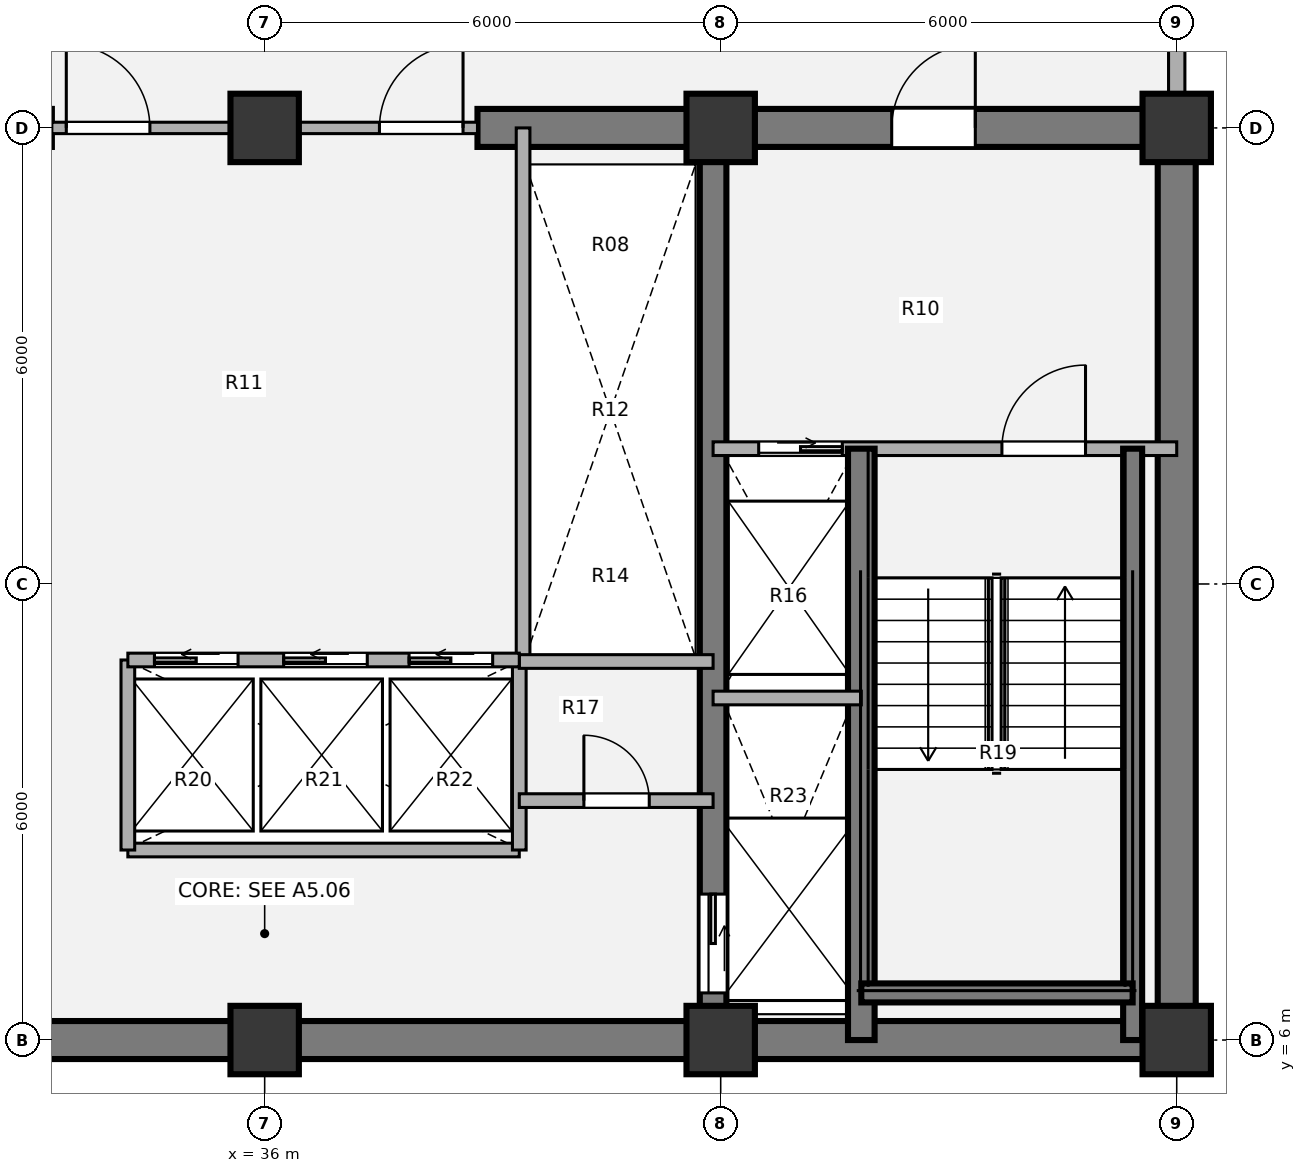
"""IFC4 building model, lengths in metres.
Left out: names, types, materials, properties, quantities, classifications, styles, units other than length and angle.
Written with IfcOpenShell. Run it as: python <this file> out.ifc"""

import sys

from ifc_helpers import new_model, si_unit, direction, frame, frame_2d, origin, origin_2d, place, context, subcontext, project, spatial, rectangle, extrude, source, transform, mapped, element, fill, save


model = new_model("IFC4")
c1 = context("Model", 3, precision=1e-05, world=origin(), true_north=direction((0.0, 1.0)))
c2 = subcontext(c1, "Body", "Model", "MODEL_VIEW")
j1 = project(units=[si_unit("LENGTHUNIT", "METRE"), si_unit("PLANEANGLEUNIT", "RADIAN")], contexts=[c1])
p1 = place(None, origin())
s1 = spatial("IfcSite", under=j1, at=p1, CompositionType="ELEMENT")
p2 = place(p1, origin())
s2 = spatial("IfcBuilding", under=s1, at=p2, CompositionType="ELEMENT")
p3 = place(p2, frame((0.0, 0.0, 120.06)))
s3 = spatial("IfcBuildingStorey", under=s2, at=p3, CompositionType="ELEMENT", Elevation=120.06)
m1 = source(origin(), c2, "Body", "SweptSolid", [
    extrude(rectangle(XDim=0.9, YDim=0.9, at=origin_2d()), origin(), (0.0, 0.0, 1.0), 3.78),
])
for number, where, z_axis, x_axis in (
    (1, (36.0, 6.0, 0.0), (0.0, 0.0, 1.0), (1.0, 0.0, 0.0)),
    (2, (42.0, 6.0, 0.0), (0.0, 0.0, 1.0), (1.0, 0.0, 0.0)),
    (3, (48.0, 6.0, 0.0), (0.0, 0.0, 1.0), (1.0, 0.0, 0.0)),
    (4, (36.0, 18.0, 0.0), (0.0, 0.0, 1.0), (1.0, 0.0, 0.0)),
    (5, (42.0, 18.0, 0.0), (0.0, 0.0, 1.0), (1.0, 0.0, 0.0)),
    (6, (48.0, 18.0, 0.0), (0.0, 0.0, 1.0), (1.0, 0.0, 0.0)),
):
    element("IfcColumn", number, at=place(p3, frame(where, z_axis=z_axis, x_axis=x_axis)), inside=s3, PredefinedType="COLUMN", context=c2, shape_type="MappedRepresentation", body=[
        mapped(m1, transform((0.0, 0.0, 0.0), x_axis=(1.0, 0.0, 0.0), y_axis=(0.0, 1.0, 0.0), z_axis=(0.0, 0.0, 1.0), scale=1.0)),
    ])
p4 = place(p3, frame((48.25, 6.0, 0.0), z_axis=(0.0, 0.0, 1.0), x_axis=(-1.0, 0.0, 0.0)))
e7 = element("IfcWall", 7, at=p4, inside=s3, PredefinedType="SHEAR", context=c2, shape_type="SweptSolid", body=[
    extrude(rectangle(XDim=24.5, YDim=0.5, at=frame_2d((12.25, 0.0))), origin(), (0.0, 0.0, 1.0), 3.78),
])
p5 = place(p3, frame((48.0, 18.0, 0.0), z_axis=(0.0, 0.0, 1.0), x_axis=(0.0, -1.0, 0.0)))
e8 = element("IfcWall", 8, at=p5, inside=s3, PredefinedType="SHEAR", context=c2, shape_type="SweptSolid", body=[
    extrude(rectangle(XDim=12.0, YDim=0.5, at=frame_2d((6.0, 0.0))), origin(), (0.0, 0.0, 1.0), 3.78),
])
p6 = place(p3, frame((23.75, 18.0, 0.0), z_axis=(0.0, 0.0, 1.0), x_axis=(1.0, 0.0, 0.0)))
e9 = element("IfcWall", 9, at=p6, inside=s3, PredefinedType="SHEAR", context=c2, shape_type="SweptSolid", body=[
    extrude(rectangle(XDim=9.45, YDim=0.5, at=frame_2d((4.725, 0.0))), origin(), (0.0, 0.0, 1.0), 3.78),
])
p7 = place(p6, frame((2.95, 0.0, 0.0)))
e10 = element("IfcOpeningElement", 10, at=p7, cuts=e9, PredefinedType="OPENING", context=c2, shape_type="SweptSolid", body=[
    extrude(rectangle(XDim=1.1, YDim=2.1, at=origin_2d()), frame((0.55, 0.26, 1.05), z_axis=(0.0, -1.0, 0.0), x_axis=(1.0, 0.0, 0.0)), (0.0, 0.0, 1.0), 0.52),
])
p8 = place(p3, frame((38.8, 18.0, 0.0), z_axis=(0.0, 0.0, 1.0), x_axis=(1.0, 0.0, 0.0)))
e11 = element("IfcWall", 11, at=p8, inside=s3, PredefinedType="SHEAR", context=c2, shape_type="SweptSolid", body=[
    extrude(rectangle(XDim=9.45, YDim=0.5, at=frame_2d((4.725, 0.0))), origin(), (0.0, 0.0, 1.0), 3.78),
])
p9 = place(p8, frame((5.45, 0.0, 0.0)))
e12 = element("IfcOpeningElement", 12, at=p9, cuts=e11, PredefinedType="OPENING", context=c2, shape_type="SweptSolid", body=[
    extrude(rectangle(XDim=1.1, YDim=2.1, at=origin_2d()), frame((0.55, 0.26, 1.05), z_axis=(0.0, -1.0, 0.0), x_axis=(1.0, 0.0, 0.0)), (0.0, 0.0, 1.0), 0.52),
])
p10 = place(p3, frame((41.9, 18.0, 0.0), z_axis=(0.0, 0.0, 1.0), x_axis=(0.0, -1.0, 0.0)))
e13 = element("IfcWall", 13, at=p10, inside=s3, PredefinedType="SHEAR", context=c2, shape_type="SweptSolid", body=[
    extrude(rectangle(XDim=12.0, YDim=0.35, at=frame_2d((6.0, 0.0))), origin(), (0.0, 0.0, 1.0), 3.78),
])
p11 = place(p10, frame((10.08, 0.0, 0.0)))
e14 = element("IfcOpeningElement", 14, at=p11, cuts=e13, PredefinedType="OPENING", context=c2, shape_type="SweptSolid", body=[
    extrude(rectangle(XDim=1.3, YDim=2.1, at=origin_2d()), frame((0.65, 0.185, 1.05), z_axis=(0.0, -1.0, 0.0), x_axis=(1.0, 0.0, 0.0)), (0.0, 0.0, 1.0), 0.37),
])
p12 = place(p3, frame((48.0, 21.05, 0.0), z_axis=(0.0, 0.0, 1.0), x_axis=(0.0, -1.0, 0.0)))
e15 = element("IfcWall", 15, at=p12, inside=s3, PredefinedType="SOLIDWALL", context=c2, shape_type="SweptSolid", body=[
    extrude(rectangle(XDim=2.62, YDim=0.215, at=frame_2d((1.31, 0.0))), origin(), (0.0, 0.0, 1.0), 3.53),
])
p13 = place(p3, frame((34.2, 8.5, 0.0), z_axis=(0.0, 0.0, 1.0), x_axis=(1.0, 0.0, 0.0)))
e16 = element("IfcWall", 16, at=p13, inside=s3, PredefinedType="PARTITIONING", context=c2, shape_type="SweptSolid", body=[
    extrude(rectangle(XDim=5.15, YDim=0.18, at=frame_2d((2.575, 0.0))), origin(), (0.0, 0.0, 1.0), 3.5),
])
for number, where, z_axis, x_axis in (
    (17, (34.2, 8.5, 0.0), (0.0, 0.0, 1.0), (0.0, 1.0, 0.0)),
    (18, (39.35, 8.5, 0.0), (0.0, 0.0, 1.0), (0.0, 1.0, 0.0)),
):
    element("IfcWall", number, at=place(p3, frame(where, z_axis=z_axis, x_axis=x_axis)), inside=s3, PredefinedType="PARTITIONING", context=c2, shape_type="SweptSolid", body=[
        extrude(rectangle(XDim=2.5, YDim=0.18, at=frame_2d((1.25, 0.0))), origin(), (0.0, 0.0, 1.0), 3.5),
    ])
p14 = place(p3, frame((39.4, 11.0, 0.0), z_axis=(0.0, 0.0, 1.0), x_axis=(0.0, 1.0, 0.0)))
e19 = element("IfcWall", 19, at=p14, inside=s3, PredefinedType="PARTITIONING", context=c2, shape_type="SweptSolid", body=[
    extrude(rectangle(XDim=7.0, YDim=0.18, at=frame_2d((3.5, 0.0))), origin(), (0.0, 0.0, 1.0), 3.5),
])
p15 = place(p3, frame((39.35, 10.98, 0.0), z_axis=(0.0, 0.0, 1.0), x_axis=(1.0, 0.0, 0.0)))
e20 = element("IfcWall", 20, at=p15, inside=s3, PredefinedType="PARTITIONING", context=c2, shape_type="SweptSolid", body=[
    extrude(rectangle(XDim=2.55, YDim=0.18, at=frame_2d((1.275, 0.0))), origin(), (0.0, 0.0, 1.0), 3.5),
])
p16 = place(p3, frame((39.35, 9.15, 0.0), z_axis=(0.0, 0.0, 1.0), x_axis=(1.0, 0.0, 0.0)))
e21 = element("IfcWall", 21, at=p16, inside=s3, PredefinedType="PARTITIONING", context=c2, shape_type="SweptSolid", body=[
    extrude(rectangle(XDim=2.55, YDim=0.18, at=frame_2d((1.275, 0.0))), origin(), (0.0, 0.0, 1.0), 3.5),
])
p17 = place(p16, frame((0.85, 0.0, 0.0)))
e22 = element("IfcOpeningElement", 22, at=p17, cuts=e21, PredefinedType="OPENING", context=c2, shape_type="SweptSolid", body=[
    extrude(rectangle(XDim=0.86, YDim=2.1, at=origin_2d()), frame((0.43, 0.1, 1.05), z_axis=(0.0, -1.0, 0.0), x_axis=(1.0, 0.0, 0.0)), (0.0, 0.0, 1.0), 0.2),
])
p18 = place(p3, frame((33.2, 18.0, 0.0), z_axis=(0.0, 0.0, 1.0), x_axis=(1.0, 0.0, 0.0)))
e23 = element("IfcWall", 23, at=p18, inside=s3, PredefinedType="PARTITIONING", context=c2, shape_type="SweptSolid", body=[
    extrude(rectangle(XDim=5.6, YDim=0.15, at=frame_2d((2.8, 0.0))), origin(), (0.0, 0.0, 1.0), 2.315),
])
p19 = place(p18, frame((0.19, 0.0, 0.0)))
e24 = element("IfcOpeningElement", 24, at=p19, cuts=e23, PredefinedType="OPENING", context=c2, shape_type="SweptSolid", body=[
    extrude(rectangle(XDim=1.1, YDim=2.1, at=origin_2d()), frame((0.55, 0.085, 1.05), z_axis=(0.0, -1.0, 0.0), x_axis=(1.0, 0.0, 0.0)), (0.0, 0.0, 1.0), 0.17),
])
p20 = place(p18, frame((4.31, 0.0, 0.0)))
e25 = element("IfcOpeningElement", 25, at=p20, cuts=e23, PredefinedType="OPENING", context=c2, shape_type="SweptSolid", body=[
    extrude(rectangle(XDim=1.1, YDim=2.1, at=origin_2d()), frame((0.55, 0.085, 1.05), z_axis=(0.0, -1.0, 0.0), x_axis=(1.0, 0.0, 0.0)), (0.0, 0.0, 1.0), 0.17),
])
p21 = place(p3, frame((41.9, 13.78, 0.0), z_axis=(0.0, 0.0, 1.0), x_axis=(1.0, 0.0, 0.0)))
e26 = element("IfcWall", 26, at=p21, inside=s3, PredefinedType="PARTITIONING", context=c2, shape_type="SweptSolid", body=[
    extrude(rectangle(XDim=6.1, YDim=0.18, at=frame_2d((3.05, 0.0))), origin(), (0.0, 0.0, 1.0), 3.5),
])
p22 = place(p21, frame((0.6, 0.0, 0.0)))
e27 = element("IfcOpeningElement", 27, at=p22, cuts=e26, PredefinedType="OPENING", context=c2, shape_type="SweptSolid", body=[
    extrude(rectangle(XDim=1.1, YDim=2.1, at=origin_2d()), frame((0.55, 0.1, 1.05), z_axis=(0.0, -1.0, 0.0), x_axis=(1.0, 0.0, 0.0)), (0.0, 0.0, 1.0), 0.2),
])
p23 = place(p21, frame((3.8, 0.0, 0.0)))
e28 = element("IfcOpeningElement", 28, at=p23, cuts=e26, PredefinedType="OPENING", context=c2, shape_type="SweptSolid", body=[
    extrude(rectangle(XDim=1.1, YDim=2.1, at=origin_2d()), frame((0.55, 0.1, 1.05), z_axis=(0.0, -1.0, 0.0), x_axis=(1.0, 0.0, 0.0)), (0.0, 0.0, 1.0), 0.2),
])
p24 = place(p3, frame((43.85, 6.0, 0.0), z_axis=(0.0, 0.0, 1.0), x_axis=(0.0, 1.0, 0.0)))
e29 = element("IfcWall", 29, at=p24, inside=s3, PredefinedType="SHEAR", context=c2, shape_type="SweptSolid", body=[
    extrude(rectangle(XDim=7.78, YDim=0.35, at=frame_2d((3.89, 0.0))), origin(), (0.0, 0.0, 1.0), 3.85),
])
p25 = place(p3, frame((47.42, 6.0, 0.0), z_axis=(0.0, 0.0, 1.0), x_axis=(0.0, 1.0, 0.0)))
e30 = element("IfcWall", 30, at=p25, inside=s3, PredefinedType="SHEAR", context=c2, shape_type="SweptSolid", body=[
    extrude(rectangle(XDim=7.78, YDim=0.25, at=frame_2d((3.89, 0.0))), origin(), (0.0, 0.0, 1.0), 3.85),
])
p26 = place(p3, frame((43.85, 6.62, 0.0), z_axis=(0.0, 0.0, 1.0), x_axis=(1.0, 0.0, 0.0)))
e31 = element("IfcWall", 31, at=p26, inside=s3, PredefinedType="SHEAR", context=c2, shape_type="SweptSolid", body=[
    extrude(rectangle(XDim=3.57, YDim=0.25, at=frame_2d((1.785, 0.0))), origin(), (0.0, 0.0, 1.0), 3.85),
])
p27 = place(p3, frame((41.9, 10.5, 0.0), z_axis=(0.0, 0.0, 1.0), x_axis=(1.0, 0.0, 0.0)))
e32 = element("IfcWall", 32, at=p27, inside=s3, PredefinedType="PARTITIONING", context=c2, shape_type="SweptSolid", body=[
    extrude(rectangle(XDim=1.95, YDim=0.18, at=frame_2d((0.975, 0.0))), origin(), (0.0, 0.0, 1.0), 3.5),
])
p28 = place(p3, frame((34.2, 11.0, 0.0), z_axis=(0.0, 0.0, 1.0), x_axis=(1.0, 0.0, 0.0)))
e33 = element("IfcWall", 33, at=p28, inside=s3, PredefinedType="PARTITIONING", context=c2, shape_type="SweptSolid", body=[
    extrude(rectangle(XDim=5.15, YDim=0.18, at=frame_2d((2.575, 0.0))), origin(), (0.0, 0.0, 1.0), 3.5),
])
p29 = place(p28, frame((0.35, 0.0, 0.0)))
e34 = element("IfcOpeningElement", 34, at=p29, cuts=e33, PredefinedType="OPENING", context=c2, shape_type="SweptSolid", body=[
    extrude(rectangle(XDim=1.1, YDim=2.1, at=origin_2d()), frame((0.55, 0.1, 1.05), z_axis=(0.0, -1.0, 0.0), x_axis=(1.0, 0.0, 0.0)), (0.0, 0.0, 1.0), 0.2),
])
p30 = place(p28, frame((2.05, 0.0, 0.0)))
e35 = element("IfcOpeningElement", 35, at=p30, cuts=e33, PredefinedType="OPENING", context=c2, shape_type="SweptSolid", body=[
    extrude(rectangle(XDim=1.1, YDim=2.1, at=origin_2d()), frame((0.55, 0.1, 1.05), z_axis=(0.0, -1.0, 0.0), x_axis=(1.0, 0.0, 0.0)), (0.0, 0.0, 1.0), 0.2),
])
p31 = place(p28, frame((3.7, 0.0, 0.0)))
e36 = element("IfcOpeningElement", 36, at=p31, cuts=e33, PredefinedType="OPENING", context=c2, shape_type="SweptSolid", body=[
    extrude(rectangle(XDim=1.1, YDim=2.1, at=origin_2d()), frame((0.55, 0.1, 1.05), z_axis=(0.0, -1.0, 0.0), x_axis=(1.0, 0.0, 0.0)), (0.0, 0.0, 1.0), 0.2),
])
m2 = source(origin(), c2, "Body", "SweptSolid", [
    extrude(rectangle(XDim=0.86, YDim=2.1, at=origin_2d()), frame((0.43, 0.025, 1.05), z_axis=(0.0, -1.0, 0.0), x_axis=(1.0, 0.0, 0.0)), (0.0, 0.0, 1.0), 0.05),
])
p32 = place(p17, origin())
e37 = element("IfcDoor", 37, at=p32, inside=s3, OperationType="SINGLE_SWING_LEFT", PredefinedType="DOOR", context=c2, shape_type="MappedRepresentation", body=[
    mapped(m2, transform((0.0, 0.0, 0.0), x_axis=(1.0, 0.0, 0.0), y_axis=(0.0, 1.0, 0.0), z_axis=(0.0, 0.0, 1.0), scale=1.0)),
])
fill(e22, e37)
m3 = source(origin(), c2, "Body", "SweptSolid", [
    extrude(rectangle(XDim=1.1, YDim=2.1, at=origin_2d()), frame((0.55, 0.025, 1.05), z_axis=(0.0, -1.0, 0.0), x_axis=(1.0, 0.0, 0.0)), (0.0, 0.0, 1.0), 0.05),
])
p33 = place(p19, origin())
e38 = element("IfcDoor", 38, at=p33, inside=s3, OperationType="SINGLE_SWING_LEFT", PredefinedType="DOOR", context=c2, shape_type="MappedRepresentation", body=[
    mapped(m3, transform((0.0, 0.0, 0.0), x_axis=(1.0, 0.0, 0.0), y_axis=(0.0, 1.0, 0.0), z_axis=(0.0, 0.0, 1.0), scale=1.0)),
])
fill(e24, e38)
p34 = place(p20, origin())
e39 = element("IfcDoor", 39, at=p34, inside=s3, OperationType="SINGLE_SWING_RIGHT", PredefinedType="DOOR", context=c2, shape_type="MappedRepresentation", body=[
    mapped(m3, transform((0.0, 0.0, 0.0), x_axis=(1.0, 0.0, 0.0), y_axis=(0.0, 1.0, 0.0), z_axis=(0.0, 0.0, 1.0), scale=1.0)),
])
fill(e25, e39)
m4 = source(origin(), c2, "Body", "SweptSolid", [
    extrude(rectangle(XDim=1.1, YDim=2.1, at=origin_2d()), frame((0.55, 0.025, 1.05), z_axis=(0.0, -1.0, 0.0), x_axis=(1.0, 0.0, 0.0)), (0.0, 0.0, 1.0), 0.05),
])
p35 = place(p22, origin())
e40 = element("IfcDoor", 40, at=p35, inside=s3, OperationType="SLIDING_TO_RIGHT", PredefinedType="DOOR", context=c2, shape_type="MappedRepresentation", body=[
    mapped(m4, transform((0.0, 0.0, 0.0), x_axis=(1.0, 0.0, 0.0), y_axis=(0.0, 1.0, 0.0), z_axis=(0.0, 0.0, 1.0), scale=1.0)),
])
fill(e27, e40)
m5 = source(origin(), c2, "Body", "SweptSolid", [
    extrude(rectangle(XDim=1.1, YDim=2.1, at=origin_2d()), frame((0.55, 0.025, 1.05), z_axis=(0.0, -1.0, 0.0), x_axis=(1.0, 0.0, 0.0)), (0.0, 0.0, 1.0), 0.05),
])
p36 = place(p23, origin())
e41 = element("IfcDoor", 41, at=p36, inside=s3, OperationType="SINGLE_SWING_RIGHT", PredefinedType="DOOR", context=c2, shape_type="MappedRepresentation", body=[
    mapped(m5, transform((0.0, 0.0, 0.0), x_axis=(1.0, 0.0, 0.0), y_axis=(0.0, 1.0, 0.0), z_axis=(0.0, 0.0, 1.0), scale=1.0)),
])
fill(e28, e41)
m6 = source(origin(), c2, "Body", "SweptSolid", [
    extrude(rectangle(XDim=1.3, YDim=2.1, at=origin_2d()), frame((0.65, 0.025, 1.05), z_axis=(0.0, -1.0, 0.0), x_axis=(1.0, 0.0, 0.0)), (0.0, 0.0, 1.0), 0.05),
])
p37 = place(p11, origin())
e42 = element("IfcDoor", 42, at=p37, inside=s3, OperationType="SLIDING_TO_LEFT", PredefinedType="DOOR", context=c2, shape_type="MappedRepresentation", body=[
    mapped(m6, transform((0.0, 0.0, 0.0), x_axis=(1.0, 0.0, 0.0), y_axis=(0.0, 1.0, 0.0), z_axis=(0.0, 0.0, 1.0), scale=1.0)),
])
fill(e14, e42)
p38 = place(p9, origin())
e43 = element("IfcDoor", 43, at=p38, inside=s3, OperationType="SINGLE_SWING_RIGHT", PredefinedType="DOOR", context=c2, shape_type="MappedRepresentation", body=[
    mapped(m3, transform((0.0, 0.0, 0.0), x_axis=(1.0, 0.0, 0.0), y_axis=(0.0, 1.0, 0.0), z_axis=(0.0, 0.0, 1.0), scale=1.0)),
])
fill(e12, e43)
p39 = place(p29, origin())
e44 = element("IfcDoor", 44, at=p39, inside=s3, OperationType="SLIDING_TO_LEFT", PredefinedType="DOOR", context=c2, shape_type="MappedRepresentation", body=[
    mapped(m4, transform((0.0, 0.0, 0.0), x_axis=(1.0, 0.0, 0.0), y_axis=(0.0, 1.0, 0.0), z_axis=(0.0, 0.0, 1.0), scale=1.0)),
])
fill(e34, e44)
p40 = place(p30, origin())
e45 = element("IfcDoor", 45, at=p40, inside=s3, OperationType="SLIDING_TO_LEFT", PredefinedType="DOOR", context=c2, shape_type="MappedRepresentation", body=[
    mapped(m4, transform((0.0, 0.0, 0.0), x_axis=(1.0, 0.0, 0.0), y_axis=(0.0, 1.0, 0.0), z_axis=(0.0, 0.0, 1.0), scale=1.0)),
])
fill(e35, e45)
p41 = place(p31, origin())
e46 = element("IfcDoor", 46, at=p41, inside=s3, OperationType="SLIDING_TO_LEFT", PredefinedType="DOOR", context=c2, shape_type="MappedRepresentation", body=[
    mapped(m4, transform((0.0, 0.0, 0.0), x_axis=(1.0, 0.0, 0.0), y_axis=(0.0, 1.0, 0.0), z_axis=(0.0, 0.0, 1.0), scale=1.0)),
])
fill(e36, e46)
save(model, sys.argv[1])
